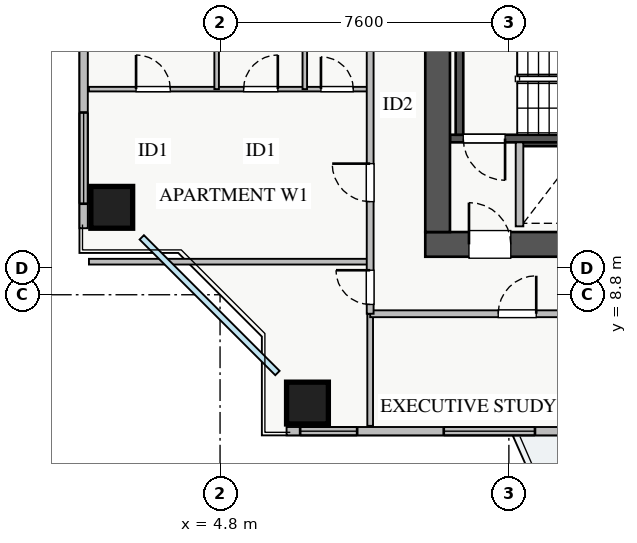
"""IFC4 building model, lengths in metres.
Left out: names, types, materials, properties, quantities, classifications, styles, units other than length and angle.
Written with IfcOpenShell. Run it as: python <this file> out.ifc"""

import sys

from ifc_helpers import new_model, si_unit, direction, frame, frame_2d, origin, origin_2d, place, context, subcontext, project, spatial, rectangle, extrude, source, transform, mapped, element, fill, save


model = new_model("IFC4")
c1 = context("Model", 3, precision=1e-05, world=origin(), true_north=direction((0.0, 1.0)))
c2 = subcontext(c1, "Body", "Model", "MODEL_VIEW")
j1 = project(units=[si_unit("LENGTHUNIT", "METRE"), si_unit("PLANEANGLEUNIT", "RADIAN")], contexts=[c1])
p1 = place(None, origin())
s1 = spatial("IfcSite", under=j1, at=p1, CompositionType="ELEMENT")
p2 = place(p1, origin())
s2 = spatial("IfcBuilding", under=s1, at=p2, CompositionType="ELEMENT")
p3 = place(p2, frame((0.0, 0.0, 106.75)))
s3 = spatial("IfcBuildingStorey", under=s2, at=p3, CompositionType="ELEMENT", Elevation=106.75)
p4 = place(p3, frame((12.68, 12.8, 0.0), z_axis=(0.0, 0.0, 1.0), x_axis=(1.0, 0.0, 0.0)))
e1 = element("IfcWall", 1, at=p4, inside=s3, PredefinedType="SHEAR", context=c2, shape_type="SweptSolid", body=[
    extrude(rectangle(XDim=1.94, YDim=0.18, at=frame_2d((0.97, 0.0))), origin(), (0.0, 0.0, 1.0), 3.07),
])
p5 = place(p3, frame((10.85, 12.91, 0.0), z_axis=(0.0, 0.0, 1.0), x_axis=(1.0, 0.0, 0.0)))
e2 = element("IfcWall", 2, at=p5, inside=s3, PredefinedType="SHEAR", context=c2, shape_type="SweptSolid", body=[
    extrude(rectangle(XDim=7.3, YDim=0.2, at=frame_2d((3.65, 0.0))), origin(), (0.0, 0.0, 1.0), 3.25),
])
p6 = place(p5, frame((0.35, 0.0, 0.0)))
e3 = element("IfcOpeningElement", 3, at=p6, cuts=e2, PredefinedType="OPENING", context=c2, shape_type="SweptSolid", body=[
    extrude(rectangle(XDim=1.1, YDim=2.05, at=frame_2d((0.55, 1.025))), frame((0.0, 0.11, 0.0), z_axis=(0.0, -1.0, 0.0), x_axis=(1.0, 0.0, 0.0)), (0.0, 0.0, 1.0), 0.22),
])
p7 = place(p3, frame((11.1, 13.01, 0.0), z_axis=(0.0, 0.0, 1.0), x_axis=(0.0, 1.0, 0.0)))
e4 = element("IfcWall", 4, at=p7, inside=s3, PredefinedType="SHEAR", context=c2, shape_type="SweptSolid", body=[
    extrude(rectangle(XDim=2.94, YDim=0.2, at=frame_2d((1.47, 0.0))), origin(), (0.0, 0.0, 1.0), 3.25),
])
p8 = place(p3, frame((10.2, 10.125, 0.0), z_axis=(0.0, 0.0, 1.0), x_axis=(1.0, 0.0, 0.0)))
e5 = element("IfcWall", 5, at=p8, inside=s3, PredefinedType="SHEAR", context=c2, shape_type="SweptSolid", body=[
    extrude(rectangle(XDim=17.6, YDim=0.65, at=frame_2d((8.8, 0.0))), origin(), (0.0, 0.0, 1.0), 3.25),
])
p9 = place(p8, frame((1.15, 0.0, 0.0)))
e6 = element("IfcOpeningElement", 6, at=p9, cuts=e5, PredefinedType="OPENING", context=c2, shape_type="SweptSolid", body=[
    extrude(rectangle(XDim=1.1, YDim=2.05, at=frame_2d((0.55, 1.025))), frame((0.0, 0.335, 0.0), z_axis=(0.0, -1.0, 0.0), x_axis=(1.0, 0.0, 0.0)), (0.0, 0.0, 1.0), 0.67),
])
p10 = place(p8, frame((8.3, 0.0, 0.0)))
e7 = element("IfcOpeningElement", 7, at=p10, cuts=e5, PredefinedType="OPENING", context=c2, shape_type="SweptSolid", body=[
    extrude(rectangle(XDim=1.1, YDim=2.05, at=frame_2d((0.55, 1.025))), frame((0.0, 0.335, 0.0), z_axis=(0.0, -1.0, 0.0), x_axis=(1.0, 0.0, 0.0)), (0.0, 0.0, 1.0), 0.67),
])
p11 = place(p8, frame((4.9, 0.0, 0.0)))
e8 = element("IfcOpeningElement", 8, at=p11, cuts=e5, PredefinedType="OPENING", context=c2, shape_type="SweptSolid", body=[
    extrude(rectangle(XDim=1.1, YDim=2.05, at=frame_2d((0.55, 1.025))), frame((0.0, 0.335, 0.0), z_axis=(0.0, -1.0, 0.0), x_axis=(1.0, 0.0, 0.0)), (0.0, 0.0, 1.0), 0.67),
])
p12 = place(p8, frame((14.74, 0.0, 0.0)))
e9 = element("IfcOpeningElement", 9, at=p12, cuts=e5, PredefinedType="OPENING", context=c2, shape_type="SweptSolid", body=[
    extrude(rectangle(XDim=1.0, YDim=2.05, at=frame_2d((0.5, 1.025))), frame((0.0, 0.335, 0.0), z_axis=(0.0, -1.0, 0.0), x_axis=(1.0, 0.0, 0.0)), (0.0, 0.0, 1.0), 0.67),
])
p13 = place(p8, frame((11.67, 0.0, 0.0)))
e10 = element("IfcOpeningElement", 10, at=p13, cuts=e5, PredefinedType="OPENING", context=c2, shape_type="SweptSolid", body=[
    extrude(rectangle(XDim=1.0, YDim=2.05, at=frame_2d((0.5, 1.025))), frame((0.0, 0.335, 0.0), z_axis=(0.0, -1.0, 0.0), x_axis=(1.0, 0.0, 0.0)), (0.0, 0.0, 1.0), 0.67),
])
p14 = place(p3, frame((10.525, 10.45, 0.0), z_axis=(0.0, 0.0, 1.0), x_axis=(0.0, 1.0, 0.0)))
e11 = element("IfcWall", 11, at=p14, inside=s3, PredefinedType="SHEAR", context=c2, shape_type="SweptSolid", body=[
    extrude(rectangle(XDim=5.9, YDim=0.65, at=frame_2d((2.95, 0.0))), origin(), (0.0, 0.0, 1.0), 3.25),
])
m1 = source(origin(), c2, "Body", "SweptSolid", [
    extrude(rectangle(XDim=1.1, YDim=1.1, at=origin_2d()), origin(), (0.0, 0.0, 1.0), 3.25),
])
for number, where, z_axis, x_axis in (
    (12, (7.1, 5.95, 0.0), (0.0, 0.0, 1.0), (1.0, 0.0, 0.0)),
    (13, (1.95, 11.1, 0.0), (0.0, 0.0, 1.0), (1.0, 0.0, 0.0)),
):
    element("IfcColumn", number, at=place(p3, frame(where, z_axis=z_axis, x_axis=x_axis)), inside=s3, PredefinedType="COLUMN", context=c2, shape_type="MappedRepresentation", body=[
        mapped(m1, transform((0.0, 0.0, 0.0), x_axis=(1.0, 0.0, 0.0), y_axis=(0.0, 1.0, 0.0), z_axis=(0.0, 0.0, 1.0), scale=1.0)),
    ])
p15 = place(p3, frame((6.55, 5.21, 0.0), z_axis=(0.0, 0.0, 1.0), x_axis=(1.0, 0.0, 0.0)))
e14 = element("IfcWall", 14, at=p15, inside=s3, PredefinedType="STANDARD", context=c2, shape_type="SweptSolid", body=[
    extrude(rectangle(XDim=24.9, YDim=0.22, at=frame_2d((12.45, 0.0))), origin(), (0.0, 0.0, 1.0), 2.61),
])
p16 = place(p15, frame((13.3, 0.0, 0.0)))
e15 = element("IfcOpeningElement", 15, at=p16, cuts=e14, PredefinedType="OPENING", context=c2, shape_type="SweptSolid", body=[
    extrude(rectangle(XDim=1.2, YDim=2.1, at=frame_2d((0.6, 1.05))), frame((0.0, 0.12, 0.0), z_axis=(0.0, -1.0, 0.0), x_axis=(1.0, 0.0, 0.0)), (0.0, 0.0, 1.0), 0.24),
])
p17 = place(p15, frame((0.357, 0.0, 0.9)))
e16 = element("IfcOpeningElement", 16, at=p17, cuts=e14, PredefinedType="OPENING", context=c2, shape_type="SweptSolid", body=[
    extrude(rectangle(XDim=1.5, YDim=1.5, at=frame_2d((0.75, 0.75))), frame((0.0, 0.12, 0.0), z_axis=(0.0, -1.0, 0.0), x_axis=(1.0, 0.0, 0.0)), (0.0, 0.0, 1.0), 0.24),
])
p18 = place(p15, frame((7.321, 0.0, 0.9)))
e17 = element("IfcOpeningElement", 17, at=p18, cuts=e14, PredefinedType="OPENING", context=c2, shape_type="SweptSolid", body=[
    extrude(rectangle(XDim=1.8, YDim=1.5, at=frame_2d((0.9, 0.75))), frame((0.0, 0.12, 0.0), z_axis=(0.0, -1.0, 0.0), x_axis=(1.0, 0.0, 0.0)), (0.0, 0.0, 1.0), 0.24),
])
p19 = place(p15, frame((14.813, 0.0, 0.9)))
e18 = element("IfcOpeningElement", 18, at=p19, cuts=e14, PredefinedType="OPENING", context=c2, shape_type="SweptSolid", body=[
    extrude(rectangle(XDim=1.5, YDim=1.45, at=frame_2d((0.75, 0.725))), frame((0.0, 0.12, 0.0), z_axis=(0.0, -1.0, 0.0), x_axis=(1.0, 0.0, 0.0)), (0.0, 0.0, 1.0), 0.24),
])
p20 = place(p15, frame((20.738, 0.0, 0.9)))
e19 = element("IfcOpeningElement", 19, at=p20, cuts=e14, PredefinedType="OPENING", context=c2, shape_type="SweptSolid", body=[
    extrude(rectangle(XDim=2.1, YDim=1.48, at=frame_2d((1.05, 0.74))), frame((0.0, 0.12, 0.0), z_axis=(0.0, -1.0, 0.0), x_axis=(1.0, 0.0, 0.0)), (0.0, 0.0, 1.0), 0.24),
])
p21 = place(p15, frame((4.136, 0.0, 0.9)))
e20 = element("IfcOpeningElement", 20, at=p21, cuts=e14, PredefinedType="OPENING", context=c2, shape_type="SweptSolid", body=[
    extrude(rectangle(XDim=2.4, YDim=1.5, at=frame_2d((1.2, 0.75))), frame((0.0, 0.12, 0.0), z_axis=(0.0, -1.0, 0.0), x_axis=(1.0, 0.0, 0.0)), (0.0, 0.0, 1.0), 0.24),
])
p22 = place(p3, frame((1.21, 10.55, 0.0), z_axis=(0.0, 0.0, 1.0), x_axis=(0.0, 1.0, 0.0)))
e21 = element("IfcWall", 21, at=p22, inside=s3, PredefinedType="STANDARD", context=c2, shape_type="SweptSolid", body=[
    extrude(rectangle(XDim=24.9, YDim=0.22, at=frame_2d((12.45, 0.0))), origin(), (0.0, 0.0, 1.0), 2.61),
])
p23 = place(p22, frame((13.3, 0.0, 0.0)))
e22 = element("IfcOpeningElement", 22, at=p23, cuts=e21, PredefinedType="OPENING", context=c2, shape_type="SweptSolid", body=[
    extrude(rectangle(XDim=1.2, YDim=2.1, at=frame_2d((0.6, 1.05))), frame((0.0, 0.12, 0.0), z_axis=(0.0, -1.0, 0.0), x_axis=(1.0, 0.0, 0.0)), (0.0, 0.0, 1.0), 0.24),
])
p24 = place(p22, frame((0.645, 0.0, 0.9)))
e23 = element("IfcOpeningElement", 23, at=p24, cuts=e21, PredefinedType="OPENING", context=c2, shape_type="SweptSolid", body=[
    extrude(rectangle(XDim=2.4, YDim=1.5, at=frame_2d((1.2, 0.75))), frame((0.0, 0.12, 0.0), z_axis=(0.0, -1.0, 0.0), x_axis=(1.0, 0.0, 0.0)), (0.0, 0.0, 1.0), 0.24),
])
p25 = place(p22, frame((20.737, 0.0, 0.9)))
e24 = element("IfcOpeningElement", 24, at=p25, cuts=e21, PredefinedType="OPENING", context=c2, shape_type="SweptSolid", body=[
    extrude(rectangle(XDim=2.1, YDim=1.48, at=frame_2d((1.05, 0.74))), frame((0.0, 0.12, 0.0), z_axis=(0.0, -1.0, 0.0), x_axis=(1.0, 0.0, 0.0)), (0.0, 0.0, 1.0), 0.24),
])
p26 = place(p22, frame((4.913, 0.0, 0.9)))
e25 = element("IfcOpeningElement", 25, at=p26, cuts=e21, PredefinedType="OPENING", context=c2, shape_type="SweptSolid", body=[
    extrude(rectangle(XDim=2.4, YDim=1.5, at=frame_2d((1.2, 0.75))), frame((0.0, 0.12, 0.0), z_axis=(0.0, -1.0, 0.0), x_axis=(1.0, 0.0, 0.0)), (0.0, 0.0, 1.0), 0.24),
])
p27 = place(p22, frame((14.72, 0.0, 0.9)))
e26 = element("IfcOpeningElement", 26, at=p27, cuts=e21, PredefinedType="OPENING", context=c2, shape_type="SweptSolid", body=[
    extrude(rectangle(XDim=0.9, YDim=1.2, at=frame_2d((0.45, 0.6))), frame((0.0, 0.12, 0.0), z_axis=(0.0, -1.0, 0.0), x_axis=(1.0, 0.0, 0.0)), (0.0, 0.0, 1.0), 0.24),
])
p28 = place(p22, frame((8.815, 0.0, 0.9)))
e27 = element("IfcOpeningElement", 27, at=p28, cuts=e21, PredefinedType="OPENING", context=c2, shape_type="SweptSolid", body=[
    extrude(rectangle(XDim=0.9, YDim=1.2, at=frame_2d((0.45, 0.6))), frame((0.0, 0.12, 0.0), z_axis=(0.0, -1.0, 0.0), x_axis=(1.0, 0.0, 0.0)), (0.0, 0.0, 1.0), 0.24),
])
p29 = place(p3, frame((12.68, 10.6, 0.0), z_axis=(0.0, 0.0, 1.0), x_axis=(0.0, 1.0, 0.0)))
e28 = element("IfcWall", 28, at=p29, inside=s3, PredefinedType="PARTITIONING", context=c2, shape_type="SweptSolid", body=[
    extrude(rectangle(XDim=2.21, YDim=0.2, at=frame_2d((1.105, 0.0))), origin(), (0.0, 0.0, 1.0), 3.07),
])
p30 = place(p3, frame((8.75, 5.35, 0.0), z_axis=(0.0, 0.0, 1.0), x_axis=(0.0, 1.0, 0.0)))
e29 = element("IfcWall", 29, at=p30, inside=s3, PredefinedType="PARTITIONING", context=c2, shape_type="SweptSolid", body=[
    extrude(rectangle(XDim=2.95, YDim=0.15, at=frame_2d((1.475, 0.0))), origin(), (0.0, 0.0, 1.0), 3.07),
])
p31 = place(p3, frame((8.75, 8.3, 0.0), z_axis=(0.0, 0.0, 1.0), x_axis=(1.0, 0.0, 0.0)))
e30 = element("IfcWall", 30, at=p31, inside=s3, PredefinedType="PARTITIONING", context=c2, shape_type="SweptSolid", body=[
    extrude(rectangle(XDim=23.61, YDim=0.18, at=frame_2d((11.805, 0.0))), origin(), (0.0, 0.0, 1.0), 3.07),
])
p32 = place(p31, frame((3.37, 0.0, 0.0)))
e31 = element("IfcOpeningElement", 31, at=p32, cuts=e30, PredefinedType="OPENING", context=c2, shape_type="SweptSolid", body=[
    extrude(rectangle(XDim=1.0, YDim=2.05, at=frame_2d((0.5, 1.025))), frame((0.0, 0.1, 0.0), z_axis=(0.0, -1.0, 0.0), x_axis=(1.0, 0.0, 0.0)), (0.0, 0.0, 1.0), 0.2),
])
p33 = place(p31, frame((11.115, 0.0, 0.0)))
e32 = element("IfcOpeningElement", 32, at=p33, cuts=e30, PredefinedType="OPENING", context=c2, shape_type="SweptSolid", body=[
    extrude(rectangle(XDim=1.0, YDim=2.05, at=frame_2d((0.5, 1.025))), frame((0.0, 0.1, 0.0), z_axis=(0.0, -1.0, 0.0), x_axis=(1.0, 0.0, 0.0)), (0.0, 0.0, 1.0), 0.2),
])
p34 = place(p31, frame((18.86, 0.0, 0.0)))
e33 = element("IfcOpeningElement", 33, at=p34, cuts=e30, PredefinedType="OPENING", context=c2, shape_type="SweptSolid", body=[
    extrude(rectangle(XDim=1.0, YDim=2.05, at=frame_2d((0.5, 1.025))), frame((0.0, 0.1, 0.0), z_axis=(0.0, -1.0, 0.0), x_axis=(1.0, 0.0, 0.0)), (0.0, 0.0, 1.0), 0.2),
])
p35 = place(p3, frame((1.35, 9.67, 0.0), z_axis=(0.0, 0.0, 1.0), x_axis=(1.0, 0.0, 0.0)))
e34 = element("IfcWall", 34, at=p35, inside=s3, PredefinedType="PARTITIONING", context=c2, shape_type="SweptSolid", body=[
    extrude(rectangle(XDim=7.4, YDim=0.15, at=frame_2d((3.7, 0.0))), origin(), (0.0, 0.0, 1.0), 3.07),
])
p36 = place(p3, frame((1.35, 14.21, 0.0), z_axis=(0.0, 0.0, 1.0), x_axis=(1.0, 0.0, 0.0)))
e35 = element("IfcWall", 35, at=p36, inside=s3, PredefinedType="PLUMBINGWALL", context=c2, shape_type="SweptSolid", body=[
    extrude(rectangle(XDim=7.4, YDim=0.12, at=frame_2d((3.7, 0.0))), origin(), (0.0, 0.0, 1.0), 3.07),
])
p37 = place(p36, frame((1.24, 0.0, 0.0)))
e36 = element("IfcOpeningElement", 36, at=p37, cuts=e35, PredefinedType="OPENING", context=c2, shape_type="SweptSolid", body=[
    extrude(rectangle(XDim=0.9, YDim=2.05, at=frame_2d((0.45, 1.025))), frame((0.0, 0.07, 0.0), z_axis=(0.0, -1.0, 0.0), x_axis=(1.0, 0.0, 0.0)), (0.0, 0.0, 1.0), 0.14),
])
p38 = place(p36, frame((4.07, 0.0, 0.0)))
e37 = element("IfcOpeningElement", 37, at=p38, cuts=e35, PredefinedType="OPENING", context=c2, shape_type="SweptSolid", body=[
    extrude(rectangle(XDim=0.9, YDim=2.05, at=frame_2d((0.45, 1.025))), frame((0.0, 0.07, 0.0), z_axis=(0.0, -1.0, 0.0), x_axis=(1.0, 0.0, 0.0)), (0.0, 0.0, 1.0), 0.14),
])
p39 = place(p36, frame((6.105, 0.0, 0.0)))
e38 = element("IfcOpeningElement", 38, at=p39, cuts=e35, PredefinedType="OPENING", context=c2, shape_type="SweptSolid", body=[
    extrude(rectangle(XDim=0.85, YDim=2.05, at=frame_2d((0.425, 1.025))), frame((0.0, 0.07, 0.0), z_axis=(0.0, -1.0, 0.0), x_axis=(1.0, 0.0, 0.0)), (0.0, 0.0, 1.0), 0.14),
])
for number, where, z_axis, x_axis in (
    (39, (4.71, 14.21, 0.0), (0.0, 0.0, 1.0), (0.0, 1.0, 0.0)),
    (40, (7.03, 14.21, 0.0), (0.0, 0.0, 1.0), (0.0, 1.0, 0.0)),
):
    element("IfcWall", number, at=place(p3, frame(where, z_axis=z_axis, x_axis=x_axis)), inside=s3, PredefinedType="PLUMBINGWALL", context=c2, shape_type="SweptSolid", body=[
        extrude(rectangle(XDim=4.92, YDim=0.12, at=frame_2d((2.46, 0.0))), origin(), (0.0, 0.0, 1.0), 3.07),
    ])
p40 = place(p3, frame((8.75, 8.3, 0.0), z_axis=(0.0, 0.0, 1.0), x_axis=(0.0, 1.0, 0.0)))
e41 = element("IfcWall", 41, at=p40, inside=s3, PredefinedType="PARTITIONING", context=c2, shape_type="SweptSolid", body=[
    extrude(rectangle(XDim=29.4, YDim=0.18, at=frame_2d((14.7, 0.0))), origin(), (0.0, 0.0, 1.0), 3.07),
])
p41 = place(p40, frame((28.08, 0.0, 0.0)))
e42 = element("IfcOpeningElement", 42, at=p41, cuts=e41, PredefinedType="OPENING", context=c2, shape_type="SweptSolid", body=[
    extrude(rectangle(XDim=0.9, YDim=2.05, at=frame_2d((0.45, 1.025))), frame((0.0, 0.1, 0.0), z_axis=(0.0, -1.0, 0.0), x_axis=(1.0, 0.0, 0.0)), (0.0, 0.0, 1.0), 0.2),
])
p42 = place(p40, frame((0.245, 0.0, 0.0)))
e43 = element("IfcOpeningElement", 43, at=p42, cuts=e41, PredefinedType="OPENING", context=c2, shape_type="SweptSolid", body=[
    extrude(rectangle(XDim=0.9, YDim=2.05, at=frame_2d((0.45, 1.025))), frame((0.0, 0.1, 0.0), z_axis=(0.0, -1.0, 0.0), x_axis=(1.0, 0.0, 0.0)), (0.0, 0.0, 1.0), 0.2),
])
p43 = place(p40, frame((2.95, 0.0, 0.0)))
e44 = element("IfcOpeningElement", 44, at=p43, cuts=e41, PredefinedType="OPENING", context=c2, shape_type="SweptSolid", body=[
    extrude(rectangle(XDim=1.0, YDim=2.05, at=frame_2d((0.5, 1.025))), frame((0.0, 0.1, 0.0), z_axis=(0.0, -1.0, 0.0), x_axis=(1.0, 0.0, 0.0)), (0.0, 0.0, 1.0), 0.2),
])
p44 = place(p40, frame((12.08, 0.0, 0.0)))
e45 = element("IfcOpeningElement", 45, at=p44, cuts=e41, PredefinedType="OPENING", context=c2, shape_type="SweptSolid", body=[
    extrude(rectangle(XDim=1.0, YDim=2.05, at=frame_2d((0.5, 1.025))), frame((0.0, 0.1, 0.0), z_axis=(0.0, -1.0, 0.0), x_axis=(1.0, 0.0, 0.0)), (0.0, 0.0, 1.0), 0.2),
])
p45 = place(p40, frame((22.795, 0.0, 0.0)))
e46 = element("IfcOpeningElement", 46, at=p45, cuts=e41, PredefinedType="OPENING", context=c2, shape_type="SweptSolid", body=[
    extrude(rectangle(XDim=1.0, YDim=2.05, at=frame_2d((0.5, 1.025))), frame((0.0, 0.1, 0.0), z_axis=(0.0, -1.0, 0.0), x_axis=(1.0, 0.0, 0.0)), (0.0, 0.0, 1.0), 0.2),
])
m2 = source(origin(), c2, "Body", "SweptSolid", [
    extrude(rectangle(XDim=1.5, YDim=1.5, at=frame_2d((0.75, 0.75))), frame((0.0, 0.03, 0.0), z_axis=(0.0, -1.0, 0.0), x_axis=(1.0, 0.0, 0.0)), (0.0, 0.0, 1.0), 0.06),
])
p46 = place(p17, origin())
e47 = element("IfcWindow", 47, at=p46, inside=s3, PartitioningType="TRIPLE_PANEL_VERTICAL", PredefinedType="WINDOW", context=c2, shape_type="MappedRepresentation", body=[
    mapped(m2, transform((0.0, 0.0, 0.0), x_axis=(1.0, 0.0, 0.0), y_axis=(0.0, 1.0, 0.0), z_axis=(0.0, 0.0, 1.0), scale=1.0)),
])
fill(e16, e47)
m3 = source(origin(), c2, "Body", "SweptSolid", [
    extrude(rectangle(XDim=2.4, YDim=1.5, at=frame_2d((1.2, 0.75))), frame((0.0, 0.03, 0.0), z_axis=(0.0, -1.0, 0.0), x_axis=(1.0, 0.0, 0.0)), (0.0, 0.0, 1.0), 0.06),
])
p47 = place(p24, origin())
e48 = element("IfcWindow", 48, at=p47, inside=s3, PartitioningType="TRIPLE_PANEL_VERTICAL", PredefinedType="WINDOW", context=c2, shape_type="MappedRepresentation", body=[
    mapped(m3, transform((0.0, 0.0, 0.0), x_axis=(1.0, 0.0, 0.0), y_axis=(0.0, 1.0, 0.0), z_axis=(0.0, 0.0, 1.0), scale=1.0)),
])
fill(e23, e48)
m4 = source(origin(), c2, "Body", "SweptSolid", [
    extrude(rectangle(XDim=1.1, YDim=2.05, at=frame_2d((0.55, 1.025))), frame((0.0, 0.025, 0.0), z_axis=(0.0, -1.0, 0.0), x_axis=(1.0, 0.0, 0.0)), (0.0, 0.0, 1.0), 0.05),
])
p48 = place(p9, origin())
e49 = element("IfcDoor", 49, at=p48, inside=s3, OperationType="SINGLE_SWING_LEFT", PredefinedType="DOOR", context=c2, shape_type="MappedRepresentation", body=[
    mapped(m4, transform((0.0, 0.0, 0.0), x_axis=(1.0, 0.0, 0.0), y_axis=(0.0, 1.0, 0.0), z_axis=(0.0, 0.0, 1.0), scale=1.0)),
])
fill(e6, e49)
p49 = place(p6, frame((1.1, 0.0, 0.0), z_axis=(0.0, 0.0, 1.0), x_axis=(-1.0, 0.0, 0.0)))
e50 = element("IfcDoor", 50, at=p49, inside=s3, OperationType="SINGLE_SWING_RIGHT", PredefinedType="DOOR", context=c2, shape_type="MappedRepresentation", body=[
    mapped(m4, transform((0.0, 0.0, 0.0), x_axis=(1.0, 0.0, 0.0), y_axis=(0.0, 1.0, 0.0), z_axis=(0.0, 0.0, 1.0), scale=1.0)),
])
fill(e3, e50)
m5 = source(origin(), c2, "Body", "SweptSolid", [
    extrude(rectangle(XDim=1.0, YDim=2.05, at=frame_2d((0.5, 1.025))), frame((0.0, 0.025, 0.0), z_axis=(0.0, -1.0, 0.0), x_axis=(1.0, 0.0, 0.0)), (0.0, 0.0, 1.0), 0.05),
])
p50 = place(p32, origin())
e51 = element("IfcDoor", 51, at=p50, inside=s3, OperationType="SINGLE_SWING_RIGHT", PredefinedType="DOOR", context=c2, shape_type="MappedRepresentation", body=[
    mapped(m5, transform((0.0, 0.0, 0.0), x_axis=(1.0, 0.0, 0.0), y_axis=(0.0, 1.0, 0.0), z_axis=(0.0, 0.0, 1.0), scale=1.0)),
])
fill(e31, e51)
m6 = source(origin(), c2, "Body", "SweptSolid", [
    extrude(rectangle(XDim=0.9, YDim=2.05, at=frame_2d((0.45, 1.025))), frame((0.0, 0.025, 0.0), z_axis=(0.0, -1.0, 0.0), x_axis=(1.0, 0.0, 0.0)), (0.0, 0.0, 1.0), 0.05),
])
p51 = place(p37, origin())
e52 = element("IfcDoor", 52, at=p51, inside=s3, OperationType="SINGLE_SWING_LEFT", PredefinedType="DOOR", context=c2, shape_type="MappedRepresentation", body=[
    mapped(m6, transform((0.0, 0.0, 0.0), x_axis=(1.0, 0.0, 0.0), y_axis=(0.0, 1.0, 0.0), z_axis=(0.0, 0.0, 1.0), scale=1.0)),
])
fill(e36, e52)
p52 = place(p38, origin())
e53 = element("IfcDoor", 53, at=p52, inside=s3, OperationType="SINGLE_SWING_RIGHT", PredefinedType="DOOR", context=c2, shape_type="MappedRepresentation", body=[
    mapped(m6, transform((0.0, 0.0, 0.0), x_axis=(1.0, 0.0, 0.0), y_axis=(0.0, 1.0, 0.0), z_axis=(0.0, 0.0, 1.0), scale=1.0)),
])
fill(e37, e53)
m7 = source(origin(), c2, "Body", "SweptSolid", [
    extrude(rectangle(XDim=0.85, YDim=2.05, at=frame_2d((0.425, 1.025))), frame((0.0, 0.025, 0.0), z_axis=(0.0, -1.0, 0.0), x_axis=(1.0, 0.0, 0.0)), (0.0, 0.0, 1.0), 0.05),
])
p53 = place(p39, origin())
e54 = element("IfcDoor", 54, at=p53, inside=s3, OperationType="SINGLE_SWING_LEFT", PredefinedType="DOOR", context=c2, shape_type="MappedRepresentation", body=[
    mapped(m7, transform((0.0, 0.0, 0.0), x_axis=(1.0, 0.0, 0.0), y_axis=(0.0, 1.0, 0.0), z_axis=(0.0, 0.0, 1.0), scale=1.0)),
])
fill(e38, e54)
p54 = place(p42, origin())
e55 = element("IfcDoor", 55, at=p54, inside=s3, OperationType="SINGLE_SWING_RIGHT", PredefinedType="DOOR", context=c2, shape_type="MappedRepresentation", body=[
    mapped(m6, transform((0.0, 0.0, 0.0), x_axis=(1.0, 0.0, 0.0), y_axis=(0.0, 1.0, 0.0), z_axis=(0.0, 0.0, 1.0), scale=1.0)),
])
fill(e43, e55)
p55 = place(p43, origin())
e56 = element("IfcDoor", 56, at=p55, inside=s3, OperationType="SINGLE_SWING_RIGHT", PredefinedType="DOOR", context=c2, shape_type="MappedRepresentation", body=[
    mapped(m5, transform((0.0, 0.0, 0.0), x_axis=(1.0, 0.0, 0.0), y_axis=(0.0, 1.0, 0.0), z_axis=(0.0, 0.0, 1.0), scale=1.0)),
])
fill(e44, e56)
p56 = place(p21, origin())
e57 = element("IfcWindow", 57, at=p56, inside=s3, PartitioningType="TRIPLE_PANEL_VERTICAL", PredefinedType="WINDOW", context=c2, shape_type="MappedRepresentation", body=[
    mapped(m3, transform((0.0, 0.0, 0.0), x_axis=(1.0, 0.0, 0.0), y_axis=(0.0, 1.0, 0.0), z_axis=(0.0, 0.0, 1.0), scale=1.0)),
])
fill(e20, e57)
save(model, sys.argv[1])
